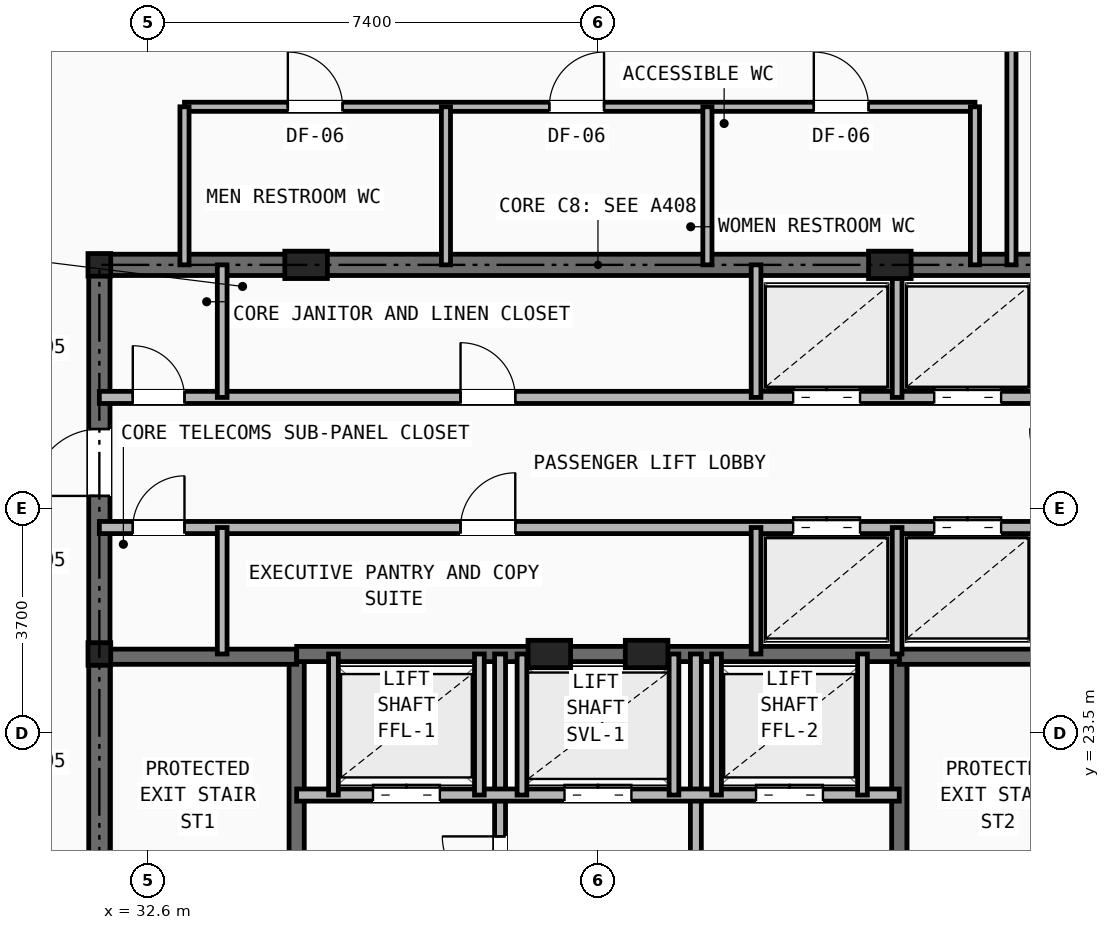
"""IFC4 building model, lengths in metres.
Left out: names, types, materials, properties, quantities, classifications, styles, units other than length and angle.
Written with IfcOpenShell. Run it as: python <this file> out.ifc"""

import sys

from ifc_helpers import new_model, si_unit, direction, frame, frame_2d, origin, origin_2d, place, context, subcontext, project, spatial, rectangle, i_section, extrude, element, fill, save


model = new_model("IFC4")
c1 = context("Model", 3, precision=1e-05, world=origin(), true_north=direction((0.0, 1.0)))
c2 = subcontext(c1, "Body", "Model", "MODEL_VIEW")
j1 = project(units=[si_unit("LENGTHUNIT", "METRE"), si_unit("PLANEANGLEUNIT", "RADIAN")], contexts=[c1])
p1 = place(None, origin())
s1 = spatial("IfcSite", under=j1, at=p1, CompositionType="ELEMENT")
p2 = place(p1, origin())
s2 = spatial("IfcBuilding", under=s1, at=p2, CompositionType="ELEMENT")
p3 = place(p2, frame((0.0, 0.0, 262.0)))
s3 = spatial("IfcBuildingStorey", under=s2, at=p3, CompositionType="ELEMENT", Elevation=262.0)
for number, where, z_axis, x_axis in (
    (1, (31.8, 24.8, 0.0), (0.0, 0.0, 1.0), (1.0, 0.0, 0.0)),
    (2, (31.8, 31.2, 0.0), (0.0, 0.0, 1.0), (1.0, 0.0, 0.0)),
):
    element("IfcColumn", number, at=place(p3, frame(where, z_axis=z_axis, x_axis=x_axis)), inside=s3, PredefinedType="COLUMN", context=c2, shape_type="SweptSolid", body=[
        extrude(i_section(OverallWidth=0.374, OverallDepth=0.372, WebThickness=0.016, FlangeThickness=0.026, at=origin_2d()), origin(), (0.0, 0.0, 1.0), 3.5),
    ])
for number, where, z_axis, x_axis in (
    (3, (35.2, 31.2, 0.0), (0.0, 0.0, 1.0), (1.0, 0.0, 0.0)),
    (4, (44.8, 31.2, 0.0), (0.0, 0.0, 1.0), (1.0, 0.0, 0.0)),
    (5, (39.2, 24.8, 0.0), (0.0, 0.0, 1.0), (1.0, 0.0, 0.0)),
    (6, (40.8, 24.8, 0.0), (0.0, 0.0, 1.0), (1.0, 0.0, 0.0)),
):
    element("IfcColumn", number, at=place(p3, frame(where, z_axis=z_axis, x_axis=x_axis)), inside=s3, PredefinedType="PILASTER", context=c2, shape_type="SweptSolid", body=[
        extrude(rectangle(XDim=0.7, YDim=0.45, at=origin_2d()), origin(), (0.0, 0.0, 1.0), 3.5),
    ])
p4 = place(p3, frame((31.8, 31.2, 0.0), z_axis=(0.0, 0.0, 1.0), x_axis=(1.0, 0.0, 0.0)))
e7 = element("IfcWall", 7, at=p4, inside=s3, PredefinedType="SHEAR", context=c2, shape_type="SweptSolid", body=[
    extrude(rectangle(XDim=16.4, YDim=0.35, at=frame_2d((8.2, 0.0))), origin(), (0.0, 0.0, 1.0), 3.25),
])
p5 = place(p3, frame((31.8, 16.4, 0.0), z_axis=(0.0, 0.0, 1.0), x_axis=(0.0, 1.0, 0.0)))
e8 = element("IfcWall", 8, at=p5, inside=s3, PredefinedType="SHEAR", context=c2, shape_type="SweptSolid", body=[
    extrude(rectangle(XDim=14.8, YDim=0.35, at=frame_2d((7.4, 0.0))), origin(), (0.0, 0.0, 1.0), 3.25),
])
p6 = place(p5, frame((11.0, 0.0, 0.0)))
e9 = element("IfcOpeningElement", 9, at=p6, cuts=e8, PredefinedType="OPENING", context=c2, shape_type="SweptSolid", body=[
    extrude(rectangle(XDim=1.1, YDim=2.15, at=frame_2d((0.55, 1.075))), frame((0.0, 0.185, 0.0), z_axis=(0.0, -1.0, 0.0), x_axis=(1.0, 0.0, 0.0)), (0.0, 0.0, 1.0), 0.37),
])
p7 = place(p3, frame((35.045, 16.4, 0.0), z_axis=(0.0, 0.0, 1.0), x_axis=(0.0, 1.0, 0.0)))
e10 = element("IfcWall", 10, at=p7, inside=s3, PredefinedType="SHEAR", context=c2, shape_type="SweptSolid", body=[
    extrude(rectangle(XDim=8.4, YDim=0.25, at=frame_2d((4.2, 0.0))), origin(), (0.0, 0.0, 1.0), 3.25),
])
p8 = place(p7, frame((0.45, 0.0, 0.0)))
e11 = element("IfcOpeningElement", 11, at=p8, cuts=e10, PredefinedType="OPENING", context=c2, shape_type="SweptSolid", body=[
    extrude(rectangle(XDim=0.95, YDim=2.1, at=frame_2d((0.475, 1.05))), frame((0.0, 0.135, 0.0), z_axis=(0.0, -1.0, 0.0), x_axis=(1.0, 0.0, 0.0)), (0.0, 0.0, 1.0), 0.27),
])
p9 = place(p3, frame((31.8, 24.755, 0.0), z_axis=(0.0, 0.0, 1.0), x_axis=(1.0, 0.0, 0.0)))
e12 = element("IfcWall", 12, at=p9, inside=s3, PredefinedType="SHEAR", context=c2, shape_type="SweptSolid", body=[
    extrude(rectangle(XDim=3.245, YDim=0.25, at=frame_2d((1.623, 0.0))), origin(), (0.0, 0.0, 1.0), 3.25),
])
p10 = place(p3, frame((44.955, 16.4, 0.0), z_axis=(0.0, 0.0, 1.0), x_axis=(0.0, 1.0, 0.0)))
e13 = element("IfcWall", 13, at=p10, inside=s3, PredefinedType="SHEAR", context=c2, shape_type="SweptSolid", body=[
    extrude(rectangle(XDim=8.4, YDim=0.25, at=frame_2d((4.2, 0.0))), origin(), (0.0, 0.0, 1.0), 3.25),
])
p11 = place(p10, frame((0.45, 0.0, 0.0)))
e14 = element("IfcOpeningElement", 14, at=p11, cuts=e13, PredefinedType="OPENING", context=c2, shape_type="SweptSolid", body=[
    extrude(rectangle(XDim=0.95, YDim=2.1, at=frame_2d((0.475, 1.05))), frame((0.0, 0.135, 0.0), z_axis=(0.0, -1.0, 0.0), x_axis=(1.0, 0.0, 0.0)), (0.0, 0.0, 1.0), 0.27),
])
p12 = place(p3, frame((44.955, 24.755, 0.0), z_axis=(0.0, 0.0, 1.0), x_axis=(1.0, 0.0, 0.0)))
e15 = element("IfcWall", 15, at=p12, inside=s3, PredefinedType="SHEAR", context=c2, shape_type="SweptSolid", body=[
    extrude(rectangle(XDim=3.245, YDim=0.25, at=frame_2d((1.623, 0.0))), origin(), (0.0, 0.0, 1.0), 3.25),
])
p13 = place(p3, frame((35.045, 24.8, 0.0), z_axis=(0.0, 0.0, 1.0), x_axis=(1.0, 0.0, 0.0)))
e16 = element("IfcWall", 16, at=p13, inside=s3, PredefinedType="SHEAR", context=c2, shape_type="SweptSolid", body=[
    extrude(rectangle(XDim=9.91, YDim=0.25, at=frame_2d((4.955, 0.0))), origin(), (0.0, 0.0, 1.0), 3.25),
])
p14 = place(p3, frame((38.39, 16.4, 0.0), z_axis=(0.0, 0.0, 1.0), x_axis=(0.0, 1.0, 0.0)))
e17 = element("IfcWall", 17, at=p14, inside=s3, PredefinedType="PARTITIONING", context=c2, shape_type="SweptSolid", body=[
    extrude(rectangle(XDim=8.4, YDim=0.18, at=frame_2d((4.2, 0.0))), origin(), (0.0, 0.0, 1.0), 2.705),
])
p15 = place(p14, frame((4.45, 0.0, 0.0)))
e18 = element("IfcOpeningElement", 18, at=p15, cuts=e17, PredefinedType="OPENING", context=c2, shape_type="SweptSolid", body=[
    extrude(rectangle(XDim=0.95, YDim=2.1, at=frame_2d((0.475, 1.05))), frame((0.0, 0.1, 0.0), z_axis=(0.0, -1.0, 0.0), x_axis=(1.0, 0.0, 0.0)), (0.0, 0.0, 1.0), 0.2),
])
p16 = place(p3, frame((41.61, 16.4, 0.0), z_axis=(0.0, 0.0, 1.0), x_axis=(0.0, 1.0, 0.0)))
e19 = element("IfcWall", 19, at=p16, inside=s3, PredefinedType="PARTITIONING", context=c2, shape_type="SweptSolid", body=[
    extrude(rectangle(XDim=8.4, YDim=0.18, at=frame_2d((4.2, 0.0))), origin(), (0.0, 0.0, 1.0), 2.705),
])
p17 = place(p16, frame((2.5, 0.0, 0.0)))
e20 = element("IfcOpeningElement", 20, at=p17, cuts=e19, PredefinedType="OPENING", context=c2, shape_type="SweptSolid", body=[
    extrude(rectangle(XDim=0.85, YDim=2.05, at=frame_2d((0.425, 1.025))), frame((0.0, 0.1, 0.0), z_axis=(0.0, -1.0, 0.0), x_axis=(1.0, 0.0, 0.0)), (0.0, 0.0, 1.0), 0.2),
])
p18 = place(p3, frame((35.045, 22.48, 0.0), z_axis=(0.0, 0.0, 1.0), x_axis=(1.0, 0.0, 0.0)))
e21 = element("IfcWall", 21, at=p18, inside=s3, PredefinedType="SOLIDWALL", context=c2, shape_type="SweptSolid", body=[
    extrude(rectangle(XDim=9.91, YDim=0.2, at=frame_2d((4.955, 0.0))), origin(), (0.0, 0.0, 1.0), 3.25),
])
p19 = place(p18, frame((1.255, 0.0, 0.0)))
e22 = element("IfcOpeningElement", 22, at=p19, cuts=e21, PredefinedType="OPENING", context=c2, shape_type="SweptSolid", body=[
    extrude(rectangle(XDim=1.1, YDim=2.15, at=frame_2d((0.55, 1.075))), frame((0.0, 0.11, 0.0), z_axis=(0.0, -1.0, 0.0), x_axis=(1.0, 0.0, 0.0)), (0.0, 0.0, 1.0), 0.22),
])
p20 = place(p18, frame((7.555, 0.0, 0.0)))
e23 = element("IfcOpeningElement", 23, at=p20, cuts=e21, PredefinedType="OPENING", context=c2, shape_type="SweptSolid", body=[
    extrude(rectangle(XDim=1.1, YDim=2.15, at=frame_2d((0.55, 1.075))), frame((0.0, 0.11, 0.0), z_axis=(0.0, -1.0, 0.0), x_axis=(1.0, 0.0, 0.0)), (0.0, 0.0, 1.0), 0.22),
])
p21 = place(p18, frame((4.405, 0.0, 0.0)))
e24 = element("IfcOpeningElement", 24, at=p21, cuts=e21, PredefinedType="OPENING", context=c2, shape_type="SweptSolid", body=[
    extrude(rectangle(XDim=1.1, YDim=2.15, at=frame_2d((0.55, 1.075))), frame((0.0, 0.11, 0.0), z_axis=(0.0, -1.0, 0.0), x_axis=(1.0, 0.0, 0.0)), (0.0, 0.0, 1.0), 0.22),
])
for number, where, z_axis, x_axis in (
    (25, (35.65, 22.48, 0.0), (0.0, 0.0, 1.0), (0.0, 1.0, 0.0)),
    (26, (38.05, 22.48, 0.0), (0.0, 0.0, 1.0), (0.0, 1.0, 0.0)),
    (27, (41.95, 22.48, 0.0), (0.0, 0.0, 1.0), (0.0, 1.0, 0.0)),
    (28, (44.35, 22.48, 0.0), (0.0, 0.0, 1.0), (0.0, 1.0, 0.0)),
    (29, (38.75, 22.48, 0.0), (0.0, 0.0, 1.0), (0.0, 1.0, 0.0)),
    (30, (41.25, 22.48, 0.0), (0.0, 0.0, 1.0), (0.0, 1.0, 0.0)),
):
    element("IfcWall", number, at=place(p3, frame(where, z_axis=z_axis, x_axis=x_axis)), inside=s3, PredefinedType="SOLIDWALL", context=c2, shape_type="SweptSolid", body=[
        extrude(rectangle(XDim=2.32, YDim=0.16, at=frame_2d((1.16, 0.0))), origin(), (0.0, 0.0, 1.0), 3.25),
    ])
p22 = place(p3, frame((31.8, 29.02, 0.0), z_axis=(0.0, 0.0, 1.0), x_axis=(1.0, 0.0, 0.0)))
e31 = element("IfcWall", 31, at=p22, inside=s3, PredefinedType="SOLIDWALL", context=c2, shape_type="SweptSolid", body=[
    extrude(rectangle(XDim=16.4, YDim=0.2, at=frame_2d((8.2, 0.0))), origin(), (0.0, 0.0, 1.0), 2.705),
])
p23 = place(p22, frame((0.55, 0.0, 0.0)))
e32 = element("IfcOpeningElement", 32, at=p23, cuts=e31, PredefinedType="OPENING", context=c2, shape_type="SweptSolid", body=[
    extrude(rectangle(XDim=0.85, YDim=2.05, at=frame_2d((0.425, 1.025))), frame((0.0, 0.11, 0.0), z_axis=(0.0, -1.0, 0.0), x_axis=(1.0, 0.0, 0.0)), (0.0, 0.0, 1.0), 0.22),
])
p24 = place(p22, frame((5.94, 0.0, 0.0)))
e33 = element("IfcOpeningElement", 33, at=p24, cuts=e31, PredefinedType="OPENING", context=c2, shape_type="SweptSolid", body=[
    extrude(rectangle(XDim=0.9, YDim=2.1, at=frame_2d((0.45, 1.05))), frame((0.0, 0.11, 0.0), z_axis=(0.0, -1.0, 0.0), x_axis=(1.0, 0.0, 0.0)), (0.0, 0.0, 1.0), 0.22),
])
p25 = place(p22, frame((11.41, 0.0, 0.0)))
e34 = element("IfcOpeningElement", 34, at=p25, cuts=e31, PredefinedType="OPENING", context=c2, shape_type="SweptSolid", body=[
    extrude(rectangle(XDim=1.1, YDim=2.15, at=frame_2d((0.55, 1.075))), frame((0.0, 0.11, 0.0), z_axis=(0.0, -1.0, 0.0), x_axis=(1.0, 0.0, 0.0)), (0.0, 0.0, 1.0), 0.22),
])
p26 = place(p22, frame((13.73, 0.0, 0.0)))
e35 = element("IfcOpeningElement", 35, at=p26, cuts=e31, PredefinedType="OPENING", context=c2, shape_type="SweptSolid", body=[
    extrude(rectangle(XDim=1.1, YDim=2.15, at=frame_2d((0.55, 1.075))), frame((0.0, 0.11, 0.0), z_axis=(0.0, -1.0, 0.0), x_axis=(1.0, 0.0, 0.0)), (0.0, 0.0, 1.0), 0.22),
])
p27 = place(p3, frame((31.8, 26.88, 0.0), z_axis=(0.0, 0.0, 1.0), x_axis=(1.0, 0.0, 0.0)))
e36 = element("IfcWall", 36, at=p27, inside=s3, PredefinedType="SOLIDWALL", context=c2, shape_type="SweptSolid", body=[
    extrude(rectangle(XDim=16.4, YDim=0.2, at=frame_2d((8.2, 0.0))), origin(), (0.0, 0.0, 1.0), 2.705),
])
p28 = place(p27, frame((0.55, 0.0, 0.0)))
e37 = element("IfcOpeningElement", 37, at=p28, cuts=e36, PredefinedType="OPENING", context=c2, shape_type="SweptSolid", body=[
    extrude(rectangle(XDim=0.85, YDim=2.05, at=frame_2d((0.425, 1.025))), frame((0.0, 0.11, 0.0), z_axis=(0.0, -1.0, 0.0), x_axis=(1.0, 0.0, 0.0)), (0.0, 0.0, 1.0), 0.22),
])
p29 = place(p27, frame((5.94, 0.0, 0.0)))
e38 = element("IfcOpeningElement", 38, at=p29, cuts=e36, PredefinedType="OPENING", context=c2, shape_type="SweptSolid", body=[
    extrude(rectangle(XDim=0.9, YDim=2.1, at=frame_2d((0.45, 1.05))), frame((0.0, 0.11, 0.0), z_axis=(0.0, -1.0, 0.0), x_axis=(1.0, 0.0, 0.0)), (0.0, 0.0, 1.0), 0.22),
])
p30 = place(p27, frame((11.41, 0.0, 0.0)))
e39 = element("IfcOpeningElement", 39, at=p30, cuts=e36, PredefinedType="OPENING", context=c2, shape_type="SweptSolid", body=[
    extrude(rectangle(XDim=1.1, YDim=2.15, at=frame_2d((0.55, 1.075))), frame((0.0, 0.11, 0.0), z_axis=(0.0, -1.0, 0.0), x_axis=(1.0, 0.0, 0.0)), (0.0, 0.0, 1.0), 0.22),
])
p31 = place(p27, frame((13.73, 0.0, 0.0)))
e40 = element("IfcOpeningElement", 40, at=p31, cuts=e36, PredefinedType="OPENING", context=c2, shape_type="SweptSolid", body=[
    extrude(rectangle(XDim=1.1, YDim=2.15, at=frame_2d((0.55, 1.075))), frame((0.0, 0.11, 0.0), z_axis=(0.0, -1.0, 0.0), x_axis=(1.0, 0.0, 0.0)), (0.0, 0.0, 1.0), 0.22),
])
p32 = place(p3, frame((33.82, 29.02, 0.0), z_axis=(0.0, 0.0, 1.0), x_axis=(0.0, 1.0, 0.0)))
e41 = element("IfcWall", 41, at=p32, inside=s3, PredefinedType="SOLIDWALL", context=c2, shape_type="SweptSolid", body=[
    extrude(rectangle(XDim=2.18, YDim=0.16, at=frame_2d((1.09, 0.0))), origin(), (0.0, 0.0, 1.0), 2.705),
])
p33 = place(p3, frame((33.82, 24.8, 0.0), z_axis=(0.0, 0.0, 1.0), x_axis=(0.0, 1.0, 0.0)))
e42 = element("IfcWall", 42, at=p33, inside=s3, PredefinedType="SOLIDWALL", context=c2, shape_type="SweptSolid", body=[
    extrude(rectangle(XDim=2.08, YDim=0.16, at=frame_2d((1.04, 0.0))), origin(), (0.0, 0.0, 1.0), 3.25),
])
for number, where, z_axis, x_axis in (
    (43, (42.6, 29.02, 0.0), (0.0, 0.0, 1.0), (0.0, 1.0, 0.0)),
    (44, (44.92, 29.02, 0.0), (0.0, 0.0, 1.0), (0.0, 1.0, 0.0)),
):
    element("IfcWall", number, at=place(p3, frame(where, z_axis=z_axis, x_axis=x_axis)), inside=s3, PredefinedType="SOLIDWALL", context=c2, shape_type="SweptSolid", body=[
        extrude(rectangle(XDim=2.18, YDim=0.16, at=frame_2d((1.09, 0.0))), origin(), (0.0, 0.0, 1.0), 2.705),
    ])
for number, where, z_axis, x_axis in (
    (45, (42.6, 24.8, 0.0), (0.0, 0.0, 1.0), (0.0, 1.0, 0.0)),
    (46, (44.92, 24.8, 0.0), (0.0, 0.0, 1.0), (0.0, 1.0, 0.0)),
):
    element("IfcWall", number, at=place(p3, frame(where, z_axis=z_axis, x_axis=x_axis)), inside=s3, PredefinedType="SOLIDWALL", context=c2, shape_type="SweptSolid", body=[
        extrude(rectangle(XDim=2.08, YDim=0.16, at=frame_2d((1.04, 0.0))), origin(), (0.0, 0.0, 1.0), 3.25),
    ])
p34 = place(p3, frame((33.2, 33.8, 0.0), z_axis=(0.0, 0.0, 1.0), x_axis=(1.0, 0.0, 0.0)))
e47 = element("IfcWall", 47, at=p34, inside=s3, PredefinedType="PARTITIONING", context=c2, shape_type="SweptSolid", body=[
    extrude(rectangle(XDim=13.0, YDim=0.15, at=frame_2d((6.5, 0.0))), origin(), (0.0, 0.0, 1.0), 3.25),
])
p35 = place(p34, frame((1.7, 0.0, 0.0)))
e48 = element("IfcOpeningElement", 48, at=p35, cuts=e47, PredefinedType="OPENING", context=c2, shape_type="SweptSolid", body=[
    extrude(rectangle(XDim=0.9, YDim=2.1, at=frame_2d((0.45, 1.05))), frame((0.0, 0.085, 0.0), z_axis=(0.0, -1.0, 0.0), x_axis=(1.0, 0.0, 0.0)), (0.0, 0.0, 1.0), 0.17),
])
p36 = place(p34, frame((6.0, 0.0, 0.0)))
e49 = element("IfcOpeningElement", 49, at=p36, cuts=e47, PredefinedType="OPENING", context=c2, shape_type="SweptSolid", body=[
    extrude(rectangle(XDim=0.9, YDim=2.1, at=frame_2d((0.45, 1.05))), frame((0.0, 0.085, 0.0), z_axis=(0.0, -1.0, 0.0), x_axis=(1.0, 0.0, 0.0)), (0.0, 0.0, 1.0), 0.17),
])
p37 = place(p34, frame((10.35, 0.0, 0.0)))
e50 = element("IfcOpeningElement", 50, at=p37, cuts=e47, PredefinedType="OPENING", context=c2, shape_type="SweptSolid", body=[
    extrude(rectangle(XDim=0.9, YDim=2.1, at=frame_2d((0.45, 1.05))), frame((0.0, 0.085, 0.0), z_axis=(0.0, -1.0, 0.0), x_axis=(1.0, 0.0, 0.0)), (0.0, 0.0, 1.0), 0.17),
])
for number, where, z_axis, x_axis in (
    (51, (33.2, 31.2, 0.0), (0.0, 0.0, 1.0), (0.0, 1.0, 0.0)),
    (52, (46.2, 31.2, 0.0), (0.0, 0.0, 1.0), (0.0, 1.0, 0.0)),
    (53, (37.5, 31.2, 0.0), (0.0, 0.0, 1.0), (0.0, 1.0, 0.0)),
    (54, (41.8, 31.2, 0.0), (0.0, 0.0, 1.0), (0.0, 1.0, 0.0)),
):
    element("IfcWall", number, at=place(p3, frame(where, z_axis=z_axis, x_axis=x_axis)), inside=s3, PredefinedType="PARTITIONING", context=c2, shape_type="SweptSolid", body=[
        extrude(rectangle(XDim=2.6, YDim=0.15, at=frame_2d((1.3, 0.0))), origin(), (0.0, 0.0, 1.0), 2.705),
    ])
p38 = place(p3, frame((46.8, 31.2, 0.0), z_axis=(0.0, 0.0, 1.0), x_axis=(0.0, 1.0, 0.0)))
e55 = element("IfcWall", 55, at=p38, inside=s3, PredefinedType="PARTITIONING", context=c2, shape_type="SweptSolid", body=[
    extrude(rectangle(XDim=4.5, YDim=0.15, at=frame_2d((2.25, 0.0))), origin(), (0.0, 0.0, 1.0), 2.705),
])
p39 = place(p15, origin())
e56 = element("IfcDoor", 56, at=p39, inside=s3, OperationType="SINGLE_SWING_RIGHT", PredefinedType="DOOR", context=c2, shape_type="SweptSolid", body=[
    extrude(rectangle(XDim=0.95, YDim=2.1, at=frame_2d((0.475, 1.05))), frame((0.0, 0.025, 0.0), z_axis=(0.0, -1.0, 0.0), x_axis=(1.0, 0.0, 0.0)), (0.0, 0.0, 1.0), 0.05),
])
fill(e18, e56)
p40 = place(p19, origin())
e57 = element("IfcDoor", 57, at=p40, inside=s3, OperationType="DOUBLE_DOOR_SLIDING", PredefinedType="DOOR", context=c2, shape_type="SweptSolid", body=[
    extrude(rectangle(XDim=1.1, YDim=2.15, at=frame_2d((0.55, 1.075))), frame((0.0, 0.025, 0.0), z_axis=(0.0, -1.0, 0.0), x_axis=(1.0, 0.0, 0.0)), (0.0, 0.0, 1.0), 0.05),
])
fill(e22, e57)
p41 = place(p20, origin())
e58 = element("IfcDoor", 58, at=p41, inside=s3, OperationType="DOUBLE_DOOR_SLIDING", PredefinedType="DOOR", context=c2, shape_type="SweptSolid", body=[
    extrude(rectangle(XDim=1.1, YDim=2.15, at=frame_2d((0.55, 1.075))), frame((0.0, 0.025, 0.0), z_axis=(0.0, -1.0, 0.0), x_axis=(1.0, 0.0, 0.0)), (0.0, 0.0, 1.0), 0.05),
])
fill(e23, e58)
p42 = place(p21, origin())
e59 = element("IfcDoor", 59, at=p42, inside=s3, OperationType="DOUBLE_DOOR_SLIDING", PredefinedType="DOOR", context=c2, shape_type="SweptSolid", body=[
    extrude(rectangle(XDim=1.1, YDim=2.15, at=frame_2d((0.55, 1.075))), frame((0.0, 0.025, 0.0), z_axis=(0.0, -1.0, 0.0), x_axis=(1.0, 0.0, 0.0)), (0.0, 0.0, 1.0), 0.05),
])
fill(e24, e59)
p43 = place(p23, origin())
e60 = element("IfcDoor", 60, at=p43, inside=s3, OperationType="SINGLE_SWING_LEFT", PredefinedType="DOOR", context=c2, shape_type="SweptSolid", body=[
    extrude(rectangle(XDim=0.85, YDim=2.05, at=frame_2d((0.425, 1.025))), frame((0.0, 0.025, 0.0), z_axis=(0.0, -1.0, 0.0), x_axis=(1.0, 0.0, 0.0)), (0.0, 0.0, 1.0), 0.05),
])
fill(e32, e60)
p44 = place(p28, origin())
e61 = element("IfcDoor", 61, at=p44, inside=s3, OperationType="SINGLE_SWING_RIGHT", PredefinedType="DOOR", context=c2, shape_type="SweptSolid", body=[
    extrude(rectangle(XDim=0.85, YDim=2.05, at=frame_2d((0.425, 1.025))), frame((0.0, 0.025, 0.0), z_axis=(0.0, -1.0, 0.0), x_axis=(1.0, 0.0, 0.0)), (0.0, 0.0, 1.0), 0.05),
])
fill(e37, e61)
p45 = place(p6, origin())
e62 = element("IfcDoor", 62, at=p45, inside=s3, OperationType="SINGLE_SWING_LEFT", PredefinedType="DOOR", context=c2, shape_type="SweptSolid", body=[
    extrude(rectangle(XDim=1.1, YDim=2.15, at=frame_2d((0.55, 1.075))), frame((0.0, 0.025, 0.0), z_axis=(0.0, -1.0, 0.0), x_axis=(1.0, 0.0, 0.0)), (0.0, 0.0, 1.0), 0.05),
])
fill(e9, e62)
p46 = place(p24, origin())
e63 = element("IfcDoor", 63, at=p46, inside=s3, OperationType="SINGLE_SWING_LEFT", PredefinedType="DOOR", context=c2, shape_type="SweptSolid", body=[
    extrude(rectangle(XDim=0.9, YDim=2.1, at=frame_2d((0.45, 1.05))), frame((0.0, 0.025, 0.0), z_axis=(0.0, -1.0, 0.0), x_axis=(1.0, 0.0, 0.0)), (0.0, 0.0, 1.0), 0.05),
])
fill(e33, e63)
p47 = place(p29, origin())
e64 = element("IfcDoor", 64, at=p47, inside=s3, OperationType="SINGLE_SWING_RIGHT", PredefinedType="DOOR", context=c2, shape_type="SweptSolid", body=[
    extrude(rectangle(XDim=0.9, YDim=2.1, at=frame_2d((0.45, 1.05))), frame((0.0, 0.025, 0.0), z_axis=(0.0, -1.0, 0.0), x_axis=(1.0, 0.0, 0.0)), (0.0, 0.0, 1.0), 0.05),
])
fill(e38, e64)
p48 = place(p25, origin())
e65 = element("IfcDoor", 65, at=p48, inside=s3, OperationType="DOUBLE_DOOR_SLIDING", PredefinedType="DOOR", context=c2, shape_type="SweptSolid", body=[
    extrude(rectangle(XDim=1.1, YDim=2.15, at=frame_2d((0.55, 1.075))), frame((0.0, 0.025, 0.0), z_axis=(0.0, -1.0, 0.0), x_axis=(1.0, 0.0, 0.0)), (0.0, 0.0, 1.0), 0.05),
])
fill(e34, e65)
p49 = place(p26, origin())
e66 = element("IfcDoor", 66, at=p49, inside=s3, OperationType="DOUBLE_DOOR_SLIDING", PredefinedType="DOOR", context=c2, shape_type="SweptSolid", body=[
    extrude(rectangle(XDim=1.1, YDim=2.15, at=frame_2d((0.55, 1.075))), frame((0.0, 0.025, 0.0), z_axis=(0.0, -1.0, 0.0), x_axis=(1.0, 0.0, 0.0)), (0.0, 0.0, 1.0), 0.05),
])
fill(e35, e66)
p50 = place(p30, origin())
e67 = element("IfcDoor", 67, at=p50, inside=s3, OperationType="DOUBLE_DOOR_SLIDING", PredefinedType="DOOR", context=c2, shape_type="SweptSolid", body=[
    extrude(rectangle(XDim=1.1, YDim=2.15, at=frame_2d((0.55, 1.075))), frame((0.0, 0.025, 0.0), z_axis=(0.0, -1.0, 0.0), x_axis=(1.0, 0.0, 0.0)), (0.0, 0.0, 1.0), 0.05),
])
fill(e39, e67)
p51 = place(p31, origin())
e68 = element("IfcDoor", 68, at=p51, inside=s3, OperationType="DOUBLE_DOOR_SLIDING", PredefinedType="DOOR", context=c2, shape_type="SweptSolid", body=[
    extrude(rectangle(XDim=1.1, YDim=2.15, at=frame_2d((0.55, 1.075))), frame((0.0, 0.025, 0.0), z_axis=(0.0, -1.0, 0.0), x_axis=(1.0, 0.0, 0.0)), (0.0, 0.0, 1.0), 0.05),
])
fill(e40, e68)
p52 = place(p35, origin())
e69 = element("IfcDoor", 69, at=p52, inside=s3, OperationType="SINGLE_SWING_LEFT", PredefinedType="DOOR", context=c2, shape_type="SweptSolid", body=[
    extrude(rectangle(XDim=0.9, YDim=2.1, at=frame_2d((0.45, 1.05))), frame((0.0, 0.025, 0.0), z_axis=(0.0, -1.0, 0.0), x_axis=(1.0, 0.0, 0.0)), (0.0, 0.0, 1.0), 0.05),
])
fill(e48, e69)
p53 = place(p36, origin())
e70 = element("IfcDoor", 70, at=p53, inside=s3, OperationType="SINGLE_SWING_RIGHT", PredefinedType="DOOR", context=c2, shape_type="SweptSolid", body=[
    extrude(rectangle(XDim=0.9, YDim=2.1, at=frame_2d((0.45, 1.05))), frame((0.0, 0.025, 0.0), z_axis=(0.0, -1.0, 0.0), x_axis=(1.0, 0.0, 0.0)), (0.0, 0.0, 1.0), 0.05),
])
fill(e49, e70)
p54 = place(p37, origin())
e71 = element("IfcDoor", 71, at=p54, inside=s3, OperationType="SINGLE_SWING_LEFT", PredefinedType="DOOR", context=c2, shape_type="SweptSolid", body=[
    extrude(rectangle(XDim=0.9, YDim=2.1, at=frame_2d((0.45, 1.05))), frame((0.0, 0.025, 0.0), z_axis=(0.0, -1.0, 0.0), x_axis=(1.0, 0.0, 0.0)), (0.0, 0.0, 1.0), 0.05),
])
fill(e50, e71)
save(model, sys.argv[1])
